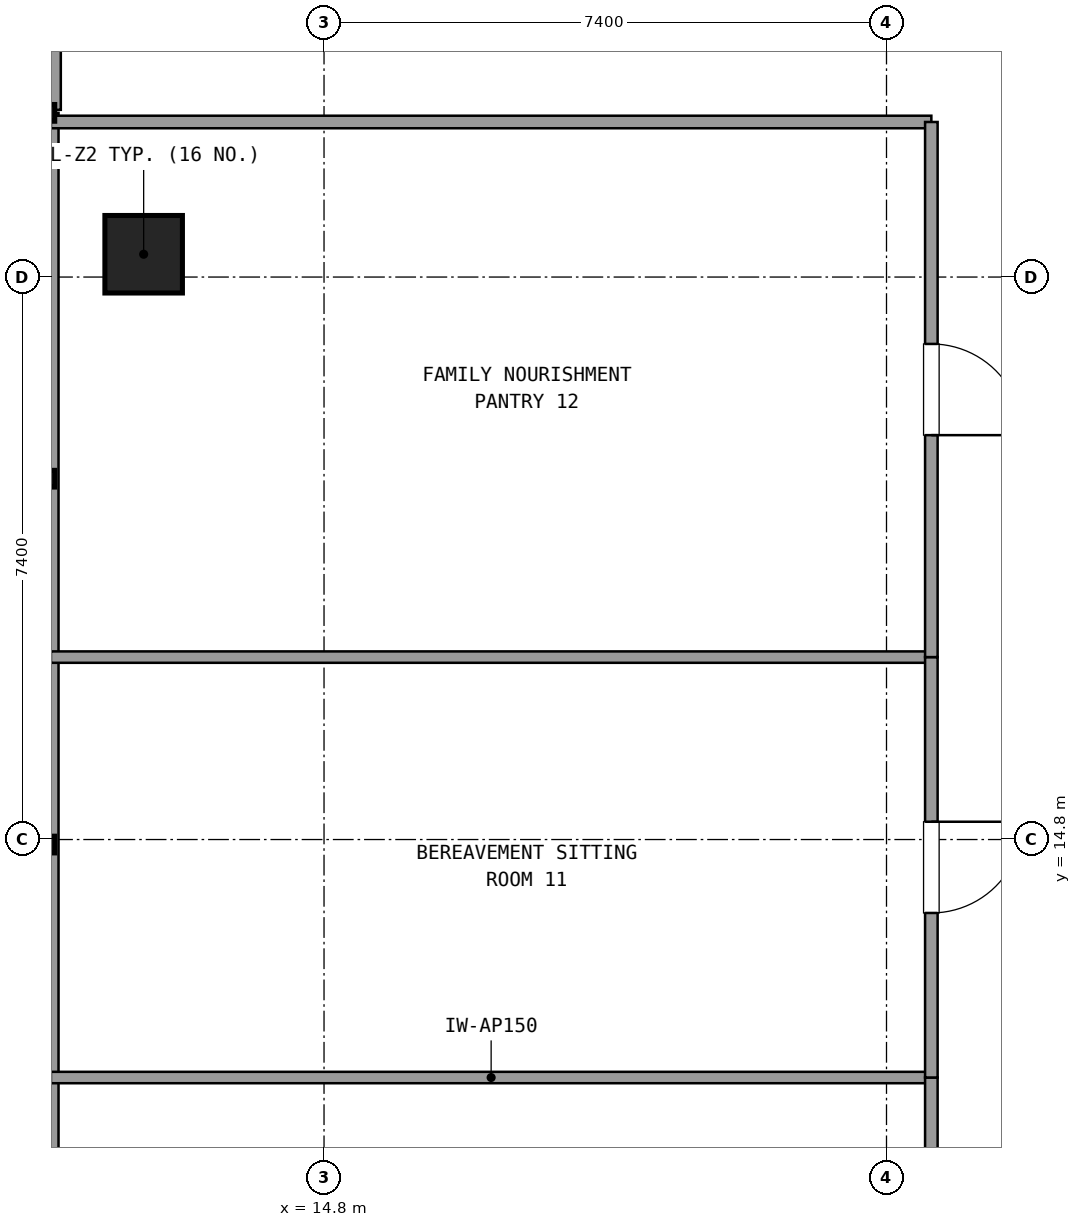
"""IFC4 building model, lengths in metres.
Left out: names, types, materials, properties, quantities, classifications, styles, units other than length and angle.
Written with IfcOpenShell. Run it as: python <this file> out.ifc"""

import sys

from ifc_helpers import new_model, si_unit, direction, frame, frame_2d, origin, origin_2d, place, context, subcontext, project, spatial, rectangle, extrude, element, fill, save


model = new_model("IFC4")
c1 = context("Model", 3, precision=1e-05, world=origin(), true_north=direction((0.0, 1.0)))
c2 = subcontext(c1, "Body", "Model", "MODEL_VIEW")
j1 = project(units=[si_unit("LENGTHUNIT", "METRE"), si_unit("PLANEANGLEUNIT", "RADIAN")], contexts=[c1])
p1 = place(None, origin())
s1 = spatial("IfcSite", under=j1, at=p1, CompositionType="ELEMENT")
p2 = place(p1, origin())
s2 = spatial("IfcBuilding", under=s1, at=p2, CompositionType="ELEMENT")
p3 = place(p2, frame((0.0, 0.0, 99.18)))
s3 = spatial("IfcBuildingStorey", under=s2, at=p3, CompositionType="ELEMENT", Elevation=99.18)
p4 = place(p3, frame((12.427, 22.5, 0.021), z_axis=(0.084573087246, 0.0, 0.99641727851), x_axis=(0.0, 1.0, 0.0)))
e1 = element("IfcColumn", 1, at=p4, inside=s3, PredefinedType="COLUMN", context=c2, shape_type="SweptSolid", body=[
    extrude(rectangle(XDim=1.02, YDim=1.02, at=origin_2d()), origin(), (0.0, 0.0, 1.0), 3.571),
])
p5 = place(p3, frame((11.187, 27.4, 0.0), z_axis=(0.0, 0.0, 1.0), x_axis=(0.0, -1.0, 0.0)))
e2 = element("IfcWall", 2, at=p5, inside=s3, PredefinedType="SOLIDWALL", context=c2, shape_type="SweptSolid", body=[
    extrude(rectangle(XDim=3.0, YDim=0.3, at=frame_2d((1.5, 0.0))), origin(), (0.0, 0.0, 1.0), 2.67),
])
p6 = place(p5, frame((0.9, 0.0, 0.0)))
e3 = element("IfcOpeningElement", 3, at=p6, cuts=e2, PredefinedType="OPENING", context=c2, shape_type="SweptSolid", body=[
    extrude(rectangle(XDim=1.2, YDim=2.2, at=frame_2d((0.6, 1.1))), frame((0.0, 0.16, 0.0), z_axis=(0.0, -1.0, 0.0), x_axis=(1.0, 0.0, 0.0)), (0.0, 0.0, 1.0), 0.32),
])
p7 = place(p3, frame((11.187, 24.36, 0.0), z_axis=(0.0, 0.0, 1.0), x_axis=(0.0, -1.0, 0.0)))
e4 = element("IfcWall", 4, at=p7, inside=s3, PredefinedType="SOLIDWALL", context=c2, shape_type="SweptSolid", body=[
    extrude(rectangle(XDim=14.439, YDim=0.24, at=frame_2d((7.22, 0.0))), origin(), (0.0, 0.0, 1.0), 0.85),
])
p8 = place(p3, frame((11.207, 24.24, 0.0), z_axis=(0.0, 0.0, 1.0), x_axis=(1.0, 0.0, 0.0)))
e5 = element("IfcWall", 5, at=p8, inside=s3, PredefinedType="PARTITIONING", context=c2, shape_type="SweptSolid", body=[
    extrude(rectangle(XDim=11.583, YDim=0.165, at=frame_2d((5.792, 0.0))), origin(), (0.0, 0.0, 1.0), 2.61),
])
p9 = place(p3, frame((22.79, 11.669, 0.0), z_axis=(0.0, 0.0, 1.0), x_axis=(-1.0, 0.0, 0.0)))
e6 = element("IfcWall", 6, at=p9, inside=s3, PredefinedType="PARTITIONING", context=c2, shape_type="SweptSolid", body=[
    extrude(rectangle(XDim=11.583, YDim=0.15, at=frame_2d((5.792, 0.0))), origin(), (0.0, 0.0, 1.0), 2.61),
])
p10 = place(p3, frame((22.79, 3.965, 0.0), z_axis=(0.0, 0.0, 1.0), x_axis=(0.0, 1.0, 0.0)))
e7 = element("IfcWall", 7, at=p10, inside=s3, PredefinedType="PARTITIONING", context=c2, shape_type="SweptSolid", body=[
    extrude(rectangle(XDim=7.704, YDim=0.165, at=frame_2d((3.852, 0.0))), origin(), (0.0, 0.0, 1.0), 2.61),
])
p11 = place(p10, frame((3.252, 0.0, 0.0)))
e8 = element("IfcOpeningElement", 8, at=p11, cuts=e7, PredefinedType="OPENING", context=c2, shape_type="SweptSolid", body=[
    extrude(rectangle(XDim=1.2, YDim=2.15, at=frame_2d((0.6, 1.075))), frame((0.0, 0.093, 0.0), z_axis=(0.0, -1.0, 0.0), x_axis=(1.0, 0.0, 0.0)), (0.0, 0.0, 1.0), 0.185),
])
p12 = place(p3, frame((22.79, 17.2, 0.0), z_axis=(0.0, 0.0, 1.0), x_axis=(-1.0, 0.0, 0.0)))
e9 = element("IfcWall", 9, at=p12, inside=s3, PredefinedType="PARTITIONING", context=c2, shape_type="SweptSolid", body=[
    extrude(rectangle(XDim=11.583, YDim=0.15, at=frame_2d((5.792, 0.0))), origin(), (0.0, 0.0, 1.0), 2.61),
])
p13 = place(p3, frame((22.79, 11.669, 0.0), z_axis=(0.0, 0.0, 1.0), x_axis=(0.0, 1.0, 0.0)))
e10 = element("IfcWall", 10, at=p13, inside=s3, PredefinedType="PARTITIONING", context=c2, shape_type="SweptSolid", body=[
    extrude(rectangle(XDim=5.531, YDim=0.165, at=frame_2d((2.766, 0.0))), origin(), (0.0, 0.0, 1.0), 2.61),
])
p14 = place(p13, frame((2.165, 0.0, 0.0)))
e11 = element("IfcOpeningElement", 11, at=p14, cuts=e10, PredefinedType="OPENING", context=c2, shape_type="SweptSolid", body=[
    extrude(rectangle(XDim=1.2, YDim=2.15, at=frame_2d((0.6, 1.075))), frame((0.0, 0.093, 0.0), z_axis=(0.0, -1.0, 0.0), x_axis=(1.0, 0.0, 0.0)), (0.0, 0.0, 1.0), 0.185),
])
p15 = place(p3, frame((22.79, 17.2, 0.0), z_axis=(0.0, 0.0, 1.0), x_axis=(0.0, 1.0, 0.0)))
e12 = element("IfcWall", 12, at=p15, inside=s3, PredefinedType="PARTITIONING", context=c2, shape_type="SweptSolid", body=[
    extrude(rectangle(XDim=7.04, YDim=0.165, at=frame_2d((3.52, 0.0))), origin(), (0.0, 0.0, 1.0), 2.61),
])
p16 = place(p15, frame((2.92, 0.0, 0.0)))
e13 = element("IfcOpeningElement", 13, at=p16, cuts=e12, PredefinedType="OPENING", context=c2, shape_type="SweptSolid", body=[
    extrude(rectangle(XDim=1.2, YDim=2.15, at=frame_2d((0.6, 1.075))), frame((0.0, 0.093, 0.0), z_axis=(0.0, -1.0, 0.0), x_axis=(1.0, 0.0, 0.0)), (0.0, 0.0, 1.0), 0.185),
])
p17 = place(p14, frame((1.2, 0.0, 0.0), z_axis=(0.0, 0.0, 1.0), x_axis=(-1.0, 0.0, 0.0)))
e14 = element("IfcDoor", 14, at=p17, inside=s3, OperationType="SINGLE_SWING_RIGHT", PredefinedType="DOOR", context=c2, shape_type="SweptSolid", body=[
    extrude(rectangle(XDim=1.2, YDim=2.15, at=frame_2d((0.6, 1.075))), frame((0.0, 0.025, 0.0), z_axis=(0.0, -1.0, 0.0), x_axis=(1.0, 0.0, 0.0)), (0.0, 0.0, 1.0), 0.05),
])
fill(e11, e14)
p18 = place(p16, frame((1.2, 0.0, 0.0), z_axis=(0.0, 0.0, 1.0), x_axis=(-1.0, 0.0, 0.0)))
e15 = element("IfcDoor", 15, at=p18, inside=s3, OperationType="SINGLE_SWING_LEFT", PredefinedType="DOOR", context=c2, shape_type="SweptSolid", body=[
    extrude(rectangle(XDim=1.2, YDim=2.15, at=frame_2d((0.6, 1.075))), frame((0.0, 0.025, 0.0), z_axis=(0.0, -1.0, 0.0), x_axis=(1.0, 0.0, 0.0)), (0.0, 0.0, 1.0), 0.05),
])
fill(e13, e15)
save(model, sys.argv[1])
